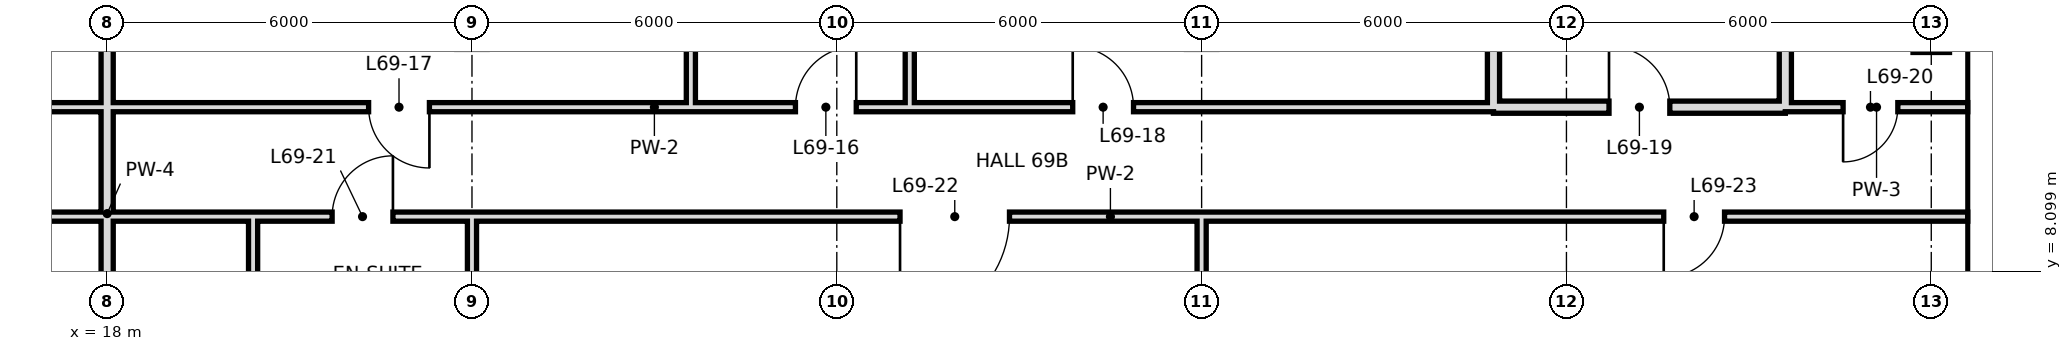
"""IFC4 building model, lengths in metres.
Left out: names, types, materials, properties, quantities, classifications, styles, units other than length and angle.
Written with IfcOpenShell. Run it as: python <this file> out.ifc"""

import sys

from ifc_helpers import new_model, si_unit, direction, frame, frame_2d, origin, place, context, subcontext, project, spatial, rectangle, extrude, element, fill, save


model = new_model("IFC4")
c1 = context("Model", 3, precision=1e-05, world=origin(), true_north=direction((0.0, 1.0)))
c2 = subcontext(c1, "Body", "Model", "MODEL_VIEW")
j1 = project(units=[si_unit("LENGTHUNIT", "METRE"), si_unit("PLANEANGLEUNIT", "RADIAN")], contexts=[c1])
p1 = place(None, origin())
s1 = spatial("IfcSite", under=j1, at=p1, CompositionType="ELEMENT")
p2 = place(p1, origin())
s2 = spatial("IfcBuilding", under=s1, at=p2, CompositionType="ELEMENT")
p3 = place(p2, frame((0.0, 0.0, 294.4)))
s3 = spatial("IfcBuildingStorey", under=s2, at=p3, CompositionType="ELEMENT", Elevation=294.4)
p4 = place(p3, frame((18.0, -0.6, 0.0), z_axis=(0.0, 0.0, 1.0), x_axis=(0.0, 1.0, 0.0)))
e1 = element("IfcWall", 1, at=p4, inside=s3, PredefinedType="SOLIDWALL", context=c2, shape_type="SweptSolid", body=[
    extrude(rectangle(XDim=19.3, YDim=0.2, at=frame_2d((9.65, 0.0))), origin(), (0.0, 0.0, 1.0), 2.72),
])
p5 = place(p3, frame((20.4, 6.0, 0.0), z_axis=(0.0, 0.0, 1.0), x_axis=(0.0, 1.0, 0.0)))
e2 = element("IfcWall", 2, at=p5, inside=s3, PredefinedType="PARTITIONING", context=c2, shape_type="SweptSolid", body=[
    extrude(rectangle(XDim=3.0, YDim=0.15, at=frame_2d((1.5, 0.0))), origin(), (0.0, 0.0, 1.0), 3.42),
])
p6 = place(p3, frame((24.0, 0.0, 0.0), z_axis=(0.0, 0.0, 1.0), x_axis=(0.0, 1.0, 0.0)))
e3 = element("IfcWall", 3, at=p6, inside=s3, PredefinedType="PARTITIONING", context=c2, shape_type="SweptSolid", body=[
    extrude(rectangle(XDim=9.0, YDim=0.15, at=frame_2d((4.5, 0.0))), origin(), (0.0, 0.0, 1.0), 2.72),
])
for number, where, z_axis, x_axis in (
    (4, (27.6, 10.8, 0.0), (0.0, 0.0, 1.0), (0.0, 1.0, 0.0)),
    (5, (31.2, 10.8, 0.0), (0.0, 0.0, 1.0), (0.0, 1.0, 0.0)),
):
    element("IfcWall", number, at=place(p3, frame(where, z_axis=z_axis, x_axis=x_axis)), inside=s3, PredefinedType="PARTITIONING", context=c2, shape_type="SweptSolid", body=[
        extrude(rectangle(XDim=7.9, YDim=0.15, at=frame_2d((3.95, 0.0))), origin(), (0.0, 0.0, 1.0), 3.42),
    ])
p7 = place(p3, frame((36.0, 0.0, 0.0), z_axis=(0.0, 0.0, 1.0), x_axis=(0.0, 1.0, 0.0)))
e6 = element("IfcWall", 6, at=p7, inside=s3, PredefinedType="PARTITIONING", context=c2, shape_type="SweptSolid", body=[
    extrude(rectangle(XDim=9.0, YDim=0.15, at=frame_2d((4.5, 0.0))), origin(), (0.0, 0.0, 1.0), 2.72),
])
p8 = place(p3, frame((40.8, 10.8, 0.0), z_axis=(0.0, 0.0, 1.0), x_axis=(0.0, 1.0, 0.0)))
e7 = element("IfcWall", 7, at=p8, inside=s3, PredefinedType="SOLIDWALL", context=c2, shape_type="SweptSolid", body=[
    extrude(rectangle(XDim=7.9, YDim=0.2, at=frame_2d((3.95, 0.0))), origin(), (0.0, 0.0, 1.0), 2.72),
])
p9 = place(p3, frame((45.6, 10.8, 0.0), z_axis=(0.0, 0.0, 1.0), x_axis=(0.0, 1.0, 0.0)))
e8 = element("IfcWall", 8, at=p9, inside=s3, PredefinedType="SOLIDWALL", context=c2, shape_type="SweptSolid", body=[
    extrude(rectangle(XDim=7.2, YDim=0.2, at=frame_2d((3.6, 0.0))), origin(), (0.0, 0.0, 1.0), 2.72),
])
p10 = place(p3, frame((40.8, 10.8, 0.0), z_axis=(0.0, 0.0, 1.0), x_axis=(1.0, 0.0, 0.0)))
e9 = element("IfcWall", 9, at=p10, inside=s3, PredefinedType="SOLIDWALL", context=c2, shape_type="SweptSolid", body=[
    extrude(rectangle(XDim=4.8, YDim=0.2, at=frame_2d((2.4, 0.0))), origin(), (0.0, 0.0, 1.0), 2.72),
])
p11 = place(p10, frame((1.9, 0.0, 0.0)))
e10 = element("IfcOpeningElement", 10, at=p11, cuts=e9, PredefinedType="OPENING", context=c2, shape_type="SweptSolid", body=[
    extrude(rectangle(XDim=1.0, YDim=2.4, at=frame_2d((0.5, 1.2))), frame((0.0, 0.11, 0.0), z_axis=(0.0, -1.0, 0.0), x_axis=(1.0, 0.0, 0.0)), (0.0, 0.0, 1.0), 0.22),
])
p12 = place(p3, frame((13.2, 10.8, 0.0), z_axis=(0.0, 0.0, 1.0), x_axis=(1.0, 0.0, 0.0)))
e11 = element("IfcWall", 11, at=p12, inside=s3, PredefinedType="PARTITIONING", context=c2, shape_type="SweptSolid", body=[
    extrude(rectangle(XDim=27.6, YDim=0.15, at=frame_2d((13.8, 0.0))), origin(), (0.0, 0.0, 1.0), 3.42),
])
p13 = place(p12, frame((2.56, 0.0, 0.0)))
e12 = element("IfcOpeningElement", 12, at=p13, cuts=e11, PredefinedType="OPENING", context=c2, shape_type="SweptSolid", body=[
    extrude(rectangle(XDim=1.0, YDim=2.4, at=frame_2d((0.5, 1.2))), frame((0.0, 0.085, 0.0), z_axis=(0.0, -1.0, 0.0), x_axis=(1.0, 0.0, 0.0)), (0.0, 0.0, 1.0), 0.17),
])
p14 = place(p12, frame((16.12, 0.0, 0.0)))
e13 = element("IfcOpeningElement", 13, at=p14, cuts=e11, PredefinedType="OPENING", context=c2, shape_type="SweptSolid", body=[
    extrude(rectangle(XDim=1.0, YDim=2.4, at=frame_2d((0.5, 1.2))), frame((0.0, 0.085, 0.0), z_axis=(0.0, -1.0, 0.0), x_axis=(1.0, 0.0, 0.0)), (0.0, 0.0, 1.0), 0.17),
])
p15 = place(p12, frame((9.1, 0.0, 0.0)))
e14 = element("IfcOpeningElement", 14, at=p15, cuts=e11, PredefinedType="OPENING", context=c2, shape_type="SweptSolid", body=[
    extrude(rectangle(XDim=1.0, YDim=2.4, at=frame_2d((0.5, 1.2))), frame((0.0, 0.085, 0.0), z_axis=(0.0, -1.0, 0.0), x_axis=(1.0, 0.0, 0.0)), (0.0, 0.0, 1.0), 0.17),
])
p16 = place(p12, frame((20.68, 0.0, 0.0)))
e15 = element("IfcOpeningElement", 15, at=p16, cuts=e11, PredefinedType="OPENING", context=c2, shape_type="SweptSolid", body=[
    extrude(rectangle(XDim=1.0, YDim=2.4, at=frame_2d((0.5, 1.2))), frame((0.0, 0.085, 0.0), z_axis=(0.0, -1.0, 0.0), x_axis=(1.0, 0.0, 0.0)), (0.0, 0.0, 1.0), 0.17),
])
p17 = place(p3, frame((45.6, 10.8, 0.0), z_axis=(0.0, 0.0, 1.0), x_axis=(1.0, 0.0, 0.0)))
e16 = element("IfcWall", 16, at=p17, inside=s3, PredefinedType="PARTITIONING", context=c2, shape_type="SweptSolid", body=[
    extrude(rectangle(XDim=3.0, YDim=0.15, at=frame_2d((1.5, 0.0))), origin(), (0.0, 0.0, 1.0), 3.42),
])
p18 = place(p17, frame((0.95, 0.0, 0.0)))
e17 = element("IfcOpeningElement", 17, at=p18, cuts=e16, PredefinedType="OPENING", context=c2, shape_type="SweptSolid", body=[
    extrude(rectangle(XDim=0.9, YDim=2.4, at=frame_2d((0.45, 1.2))), frame((0.0, 0.085, 0.0), z_axis=(0.0, -1.0, 0.0), x_axis=(1.0, 0.0, 0.0)), (0.0, 0.0, 1.0), 0.17),
])
p19 = place(p3, frame((6.0, 9.0, 0.0), z_axis=(0.0, 0.0, 1.0), x_axis=(1.0, 0.0, 0.0)))
e18 = element("IfcWall", 18, at=p19, inside=s3, PredefinedType="PARTITIONING", context=c2, shape_type="SweptSolid", body=[
    extrude(rectangle(XDim=12.0, YDim=0.15, at=frame_2d((6.0, 0.0))), origin(), (0.0, 0.0, 1.0), 3.42),
])
p20 = place(p19, frame((5.1, 0.0, 0.0)))
e19 = element("IfcOpeningElement", 19, at=p20, cuts=e18, PredefinedType="OPENING", context=c2, shape_type="SweptSolid", body=[
    extrude(rectangle(XDim=1.8, YDim=2.4, at=frame_2d((0.9, 1.2))), frame((0.0, 0.085, 0.0), z_axis=(0.0, -1.0, 0.0), x_axis=(1.0, 0.0, 0.0)), (0.0, 0.0, 1.0), 0.17),
])
p21 = place(p3, frame((20.4, 9.0, 0.0), z_axis=(0.0, 0.0, 1.0), x_axis=(1.0, 0.0, 0.0)))
e20 = element("IfcWall", 20, at=p21, inside=s3, PredefinedType="PARTITIONING", context=c2, shape_type="SweptSolid", body=[
    extrude(rectangle(XDim=28.2, YDim=0.15, at=frame_2d((14.1, 0.0))), origin(), (0.0, 0.0, 1.0), 3.42),
])
p22 = place(p21, frame((1.3, 0.0, 0.0)))
e21 = element("IfcOpeningElement", 21, at=p22, cuts=e20, PredefinedType="OPENING", context=c2, shape_type="SweptSolid", body=[
    extrude(rectangle(XDim=1.0, YDim=2.4, at=frame_2d((0.5, 1.2))), frame((0.0, 0.085, 0.0), z_axis=(0.0, -1.0, 0.0), x_axis=(1.0, 0.0, 0.0)), (0.0, 0.0, 1.0), 0.17),
])
p23 = place(p21, frame((10.64, 0.0, 0.0)))
e22 = element("IfcOpeningElement", 22, at=p23, cuts=e20, PredefinedType="OPENING", context=c2, shape_type="SweptSolid", body=[
    extrude(rectangle(XDim=1.8, YDim=2.4, at=frame_2d((0.9, 1.2))), frame((0.0, 0.085, 0.0), z_axis=(0.0, -1.0, 0.0), x_axis=(1.0, 0.0, 0.0)), (0.0, 0.0, 1.0), 0.17),
])
p24 = place(p21, frame((23.2, 0.0, 0.0)))
e23 = element("IfcOpeningElement", 23, at=p24, cuts=e20, PredefinedType="OPENING", context=c2, shape_type="SweptSolid", body=[
    extrude(rectangle(XDim=1.0, YDim=2.4, at=frame_2d((0.5, 1.2))), frame((0.0, 0.085, 0.0), z_axis=(0.0, -1.0, 0.0), x_axis=(1.0, 0.0, 0.0)), (0.0, 0.0, 1.0), 0.17),
])
p25 = place(p3, frame((18.0, 9.0, 0.0), z_axis=(0.0, 0.0, 1.0), x_axis=(1.0, 0.0, 0.0)))
e24 = element("IfcWall", 24, at=p25, inside=s3, PredefinedType="PARTITIONING", context=c2, shape_type="SweptSolid", body=[
    extrude(rectangle(XDim=2.4, YDim=0.15, at=frame_2d((1.2, 0.0))), origin(), (0.0, 0.0, 1.0), 3.42),
])
p26 = place(p14, frame((1.0, 0.0, 0.0), z_axis=(0.0, 0.0, 1.0), x_axis=(-1.0, 0.0, 0.0)))
e25 = element("IfcDoor", 25, at=p26, inside=s3, OperationType="SINGLE_SWING_LEFT", PredefinedType="DOOR", context=c2, shape_type="SweptSolid", body=[
    extrude(rectangle(XDim=1.0, YDim=2.4, at=frame_2d((0.5, 1.2))), frame((0.0, 0.025, 0.0), z_axis=(0.0, -1.0, 0.0), x_axis=(1.0, 0.0, 0.0)), (0.0, 0.0, 1.0), 0.05),
])
fill(e13, e25)
p27 = place(p15, origin())
e26 = element("IfcDoor", 26, at=p27, inside=s3, OperationType="SINGLE_SWING_RIGHT", PredefinedType="DOOR", context=c2, shape_type="SweptSolid", body=[
    extrude(rectangle(XDim=1.0, YDim=2.4, at=frame_2d((0.5, 1.2))), frame((0.0, 0.025, 0.0), z_axis=(0.0, -1.0, 0.0), x_axis=(1.0, 0.0, 0.0)), (0.0, 0.0, 1.0), 0.05),
])
fill(e14, e26)
p28 = place(p16, origin())
e27 = element("IfcDoor", 27, at=p28, inside=s3, OperationType="SINGLE_SWING_LEFT", PredefinedType="DOOR", context=c2, shape_type="SweptSolid", body=[
    extrude(rectangle(XDim=1.0, YDim=2.4, at=frame_2d((0.5, 1.2))), frame((0.0, 0.025, 0.0), z_axis=(0.0, -1.0, 0.0), x_axis=(1.0, 0.0, 0.0)), (0.0, 0.0, 1.0), 0.05),
])
fill(e15, e27)
p29 = place(p11, origin())
e28 = element("IfcDoor", 28, at=p29, inside=s3, OperationType="SINGLE_SWING_LEFT", PredefinedType="DOOR", context=c2, shape_type="SweptSolid", body=[
    extrude(rectangle(XDim=1.0, YDim=2.4, at=frame_2d((0.5, 1.2))), frame((0.0, 0.025, 0.0), z_axis=(0.0, -1.0, 0.0), x_axis=(1.0, 0.0, 0.0)), (0.0, 0.0, 1.0), 0.05),
])
fill(e10, e28)
p30 = place(p18, frame((0.9, 0.0, 0.0), z_axis=(0.0, 0.0, 1.0), x_axis=(-1.0, 0.0, 0.0)))
e29 = element("IfcDoor", 29, at=p30, inside=s3, OperationType="SINGLE_SWING_RIGHT", PredefinedType="DOOR", context=c2, shape_type="SweptSolid", body=[
    extrude(rectangle(XDim=0.9, YDim=2.4, at=frame_2d((0.45, 1.2))), frame((0.0, 0.025, 0.0), z_axis=(0.0, -1.0, 0.0), x_axis=(1.0, 0.0, 0.0)), (0.0, 0.0, 1.0), 0.05),
])
fill(e17, e29)
p31 = place(p22, frame((1.0, 0.0, 0.0), z_axis=(0.0, 0.0, 1.0), x_axis=(-1.0, 0.0, 0.0)))
e30 = element("IfcDoor", 30, at=p31, inside=s3, OperationType="SINGLE_SWING_LEFT", PredefinedType="DOOR", context=c2, shape_type="SweptSolid", body=[
    extrude(rectangle(XDim=1.0, YDim=2.4, at=frame_2d((0.5, 1.2))), frame((0.0, 0.025, 0.0), z_axis=(0.0, -1.0, 0.0), x_axis=(1.0, 0.0, 0.0)), (0.0, 0.0, 1.0), 0.05),
])
fill(e21, e30)
p32 = place(p23, frame((1.8, 0.0, 0.0), z_axis=(0.0, 0.0, 1.0), x_axis=(-1.0, 0.0, 0.0)))
e31 = element("IfcDoor", 31, at=p32, inside=s3, OperationType="SINGLE_SWING_RIGHT", PredefinedType="DOOR", context=c2, shape_type="SweptSolid", body=[
    extrude(rectangle(XDim=1.8, YDim=2.4, at=frame_2d((0.9, 1.2))), frame((0.0, 0.025, 0.0), z_axis=(0.0, -1.0, 0.0), x_axis=(1.0, 0.0, 0.0)), (0.0, 0.0, 1.0), 0.05),
])
fill(e22, e31)
p33 = place(p24, frame((1.0, 0.0, 0.0), z_axis=(0.0, 0.0, 1.0), x_axis=(-1.0, 0.0, 0.0)))
e32 = element("IfcDoor", 32, at=p33, inside=s3, OperationType="SINGLE_SWING_RIGHT", PredefinedType="DOOR", context=c2, shape_type="SweptSolid", body=[
    extrude(rectangle(XDim=1.0, YDim=2.4, at=frame_2d((0.5, 1.2))), frame((0.0, 0.025, 0.0), z_axis=(0.0, -1.0, 0.0), x_axis=(1.0, 0.0, 0.0)), (0.0, 0.0, 1.0), 0.05),
])
fill(e23, e32)
save(model, sys.argv[1])
